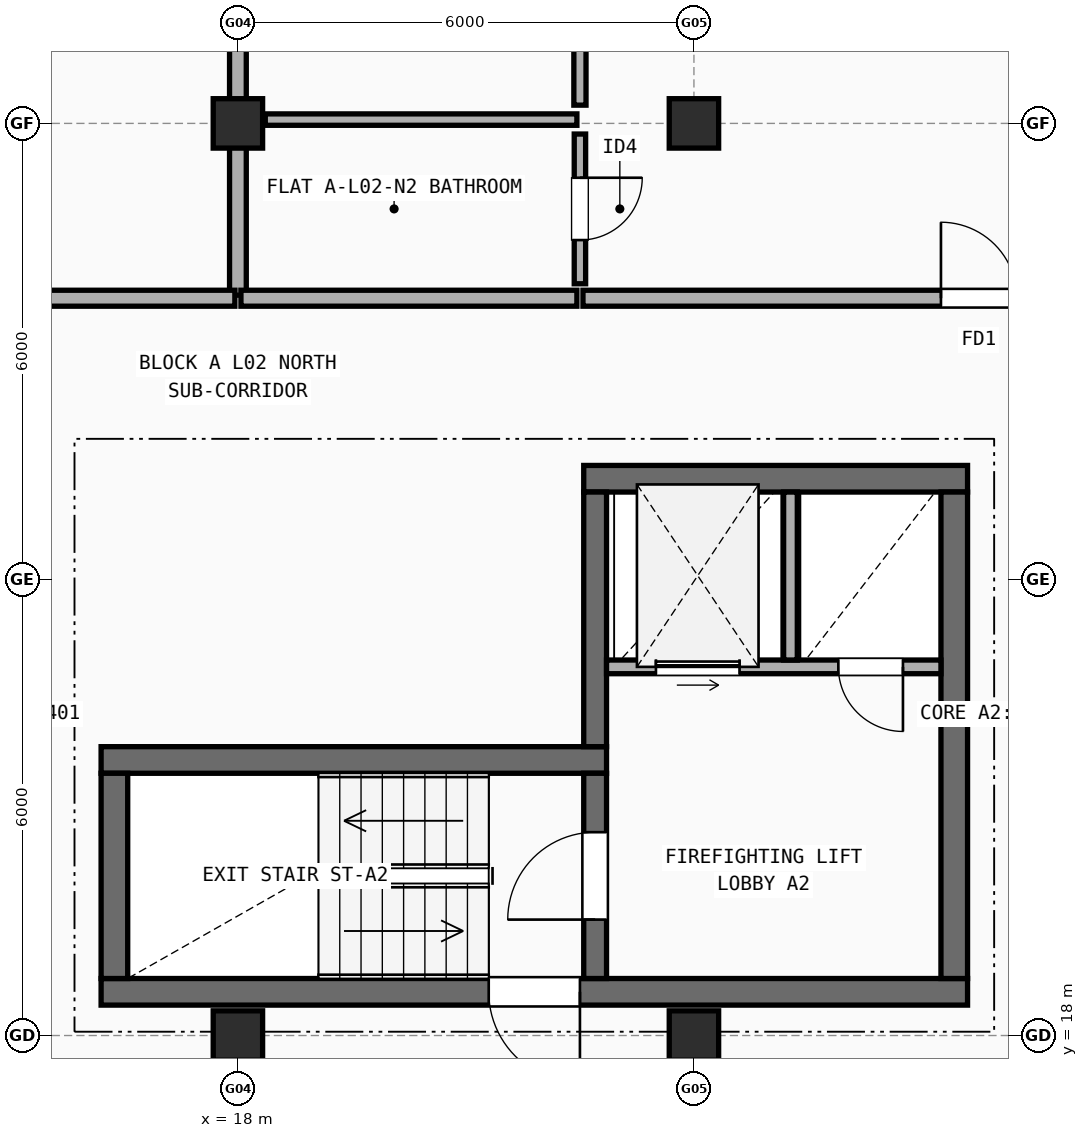
"""IFC4 building model, lengths in metres.
Left out: names, types, materials, properties, quantities, classifications, styles, units other than length and angle.
Written with IfcOpenShell. Run it as: python <this file> out.ifc"""

import sys

from ifc_helpers import new_model, si_unit, direction, frame, frame_2d, origin, origin_2d, place, context, subcontext, project, spatial, rectangle, extrude, element, fill, save


model = new_model("IFC4")
c1 = context("Model", 3, precision=1e-05, world=origin(), true_north=direction((0.0, 1.0)))
c2 = subcontext(c1, "Body", "Model", "MODEL_VIEW")
j1 = project(units=[si_unit("LENGTHUNIT", "METRE"), si_unit("PLANEANGLEUNIT", "RADIAN")], contexts=[c1])
p1 = place(None, origin())
s1 = spatial("IfcSite", under=j1, at=p1, CompositionType="ELEMENT")
p2 = place(p1, origin())
s2 = spatial("IfcBuilding", under=s1, at=p2, CompositionType="ELEMENT")
p3 = place(p2, frame((0.0, 0.0, 7.7)))
s3 = spatial("IfcBuildingStorey", under=s2, at=p3, CompositionType="ELEMENT", Elevation=7.7)
for number, where, z_axis, x_axis in (
    (1, (18.0, 18.0, 0.0), (0.0, 0.0, 1.0), (1.0, 0.0, 0.0)),
    (2, (18.0, 30.0, 0.0), (0.0, 0.0, 1.0), (1.0, 0.0, 0.0)),
    (3, (24.0, 18.0, 0.0), (0.0, 0.0, 1.0), (1.0, 0.0, 0.0)),
    (4, (24.0, 30.0, 0.0), (0.0, 0.0, 1.0), (1.0, 0.0, 0.0)),
):
    element("IfcColumn", number, at=place(p3, frame(where, z_axis=z_axis, x_axis=x_axis)), inside=s3, PredefinedType="COLUMN", context=c2, shape_type="SweptSolid", body=[
        extrude(rectangle(XDim=0.65, YDim=0.65, at=origin_2d()), origin(), (0.0, 0.0, 1.0), 2.955),
    ])
p4 = place(p3, frame((16.2, 18.575, 0.0), z_axis=(0.0, 0.0, 1.0), x_axis=(1.0, 0.0, 0.0)))
e5 = element("IfcWall", 5, at=p4, inside=s3, PredefinedType="SHEAR", context=c2, shape_type="SweptSolid", body=[
    extrude(rectangle(XDim=11.4, YDim=0.35, at=frame_2d((5.7, 0.0))), origin(), (0.0, 0.0, 1.0), 2.955),
])
p5 = place(p4, frame((5.1, 0.0, 0.0)))
e6 = element("IfcOpeningElement", 6, at=p5, cuts=e5, PredefinedType="OPENING", context=c2, shape_type="SweptSolid", body=[
    extrude(rectangle(XDim=1.2, YDim=2.15, at=frame_2d((0.6, 1.075))), frame((0.0, 0.185, 0.0), z_axis=(0.0, -1.0, 0.0), x_axis=(1.0, 0.0, 0.0)), (0.0, 0.0, 1.0), 0.37),
])
p6 = place(p3, frame((22.85, 21.625, 0.0), z_axis=(0.0, 0.0, 1.0), x_axis=(-1.0, 0.0, 0.0)))
e7 = element("IfcWall", 7, at=p6, inside=s3, PredefinedType="SHEAR", context=c2, shape_type="SweptSolid", body=[
    extrude(rectangle(XDim=6.65, YDim=0.35, at=frame_2d((3.325, 0.0))), origin(), (0.0, 0.0, 1.0), 2.955),
])
p7 = place(p3, frame((16.375, 21.45, 0.0), z_axis=(0.0, 0.0, 1.0), x_axis=(0.0, -1.0, 0.0)))
e8 = element("IfcWall", 8, at=p7, inside=s3, PredefinedType="SHEAR", context=c2, shape_type="SweptSolid", body=[
    extrude(rectangle(XDim=2.7, YDim=0.35, at=frame_2d((1.35, 0.0))), origin(), (0.0, 0.0, 1.0), 2.955),
])
p8 = place(p3, frame((22.7, 18.75, 0.0), z_axis=(0.0, 0.0, 1.0), x_axis=(0.0, 1.0, 0.0)))
e9 = element("IfcWall", 9, at=p8, inside=s3, PredefinedType="SHEAR", context=c2, shape_type="SweptSolid", body=[
    extrude(rectangle(XDim=2.7, YDim=0.3, at=frame_2d((1.35, 0.0))), origin(), (0.0, 0.0, 1.0), 2.955),
])
p9 = place(p8, frame((0.775, 0.0, 0.0)))
e10 = element("IfcOpeningElement", 10, at=p9, cuts=e9, PredefinedType="OPENING", context=c2, shape_type="SweptSolid", body=[
    extrude(rectangle(XDim=1.15, YDim=2.15, at=frame_2d((0.575, 1.075))), frame((0.0, 0.16, 0.0), z_axis=(0.0, -1.0, 0.0), x_axis=(1.0, 0.0, 0.0)), (0.0, 0.0, 1.0), 0.32),
])
p10 = place(p3, frame((27.6, 25.325, 0.0), z_axis=(0.0, 0.0, 1.0), x_axis=(-1.0, 0.0, 0.0)))
e11 = element("IfcWall", 11, at=p10, inside=s3, PredefinedType="SHEAR", context=c2, shape_type="SweptSolid", body=[
    extrude(rectangle(XDim=5.05, YDim=0.35, at=frame_2d((2.525, 0.0))), origin(), (0.0, 0.0, 1.0), 2.955),
])
p11 = place(p3, frame((27.425, 18.75, 0.0), z_axis=(0.0, 0.0, 1.0), x_axis=(0.0, 1.0, 0.0)))
e12 = element("IfcWall", 12, at=p11, inside=s3, PredefinedType="SHEAR", context=c2, shape_type="SweptSolid", body=[
    extrude(rectangle(XDim=6.4, YDim=0.35, at=frame_2d((3.2, 0.0))), origin(), (0.0, 0.0, 1.0), 2.955),
])
p12 = place(p3, frame((22.7, 21.8, 0.0), z_axis=(0.0, 0.0, 1.0), x_axis=(0.0, 1.0, 0.0)))
e13 = element("IfcWall", 13, at=p12, inside=s3, PredefinedType="SHEAR", context=c2, shape_type="SweptSolid", body=[
    extrude(rectangle(XDim=3.35, YDim=0.3, at=frame_2d((1.675, 0.0))), origin(), (0.0, 0.0, 1.0), 2.955),
])
p13 = place(p3, frame((22.85, 22.85, 0.0), z_axis=(0.0, 0.0, 1.0), x_axis=(1.0, 0.0, 0.0)))
e14 = element("IfcWall", 14, at=p13, inside=s3, PredefinedType="SOLIDWALL", context=c2, shape_type="SweptSolid", body=[
    extrude(rectangle(XDim=4.4, YDim=0.18, at=frame_2d((2.2, 0.0))), origin(), (0.0, 0.0, 1.0), 2.955),
])
p14 = place(p13, frame((0.65, 0.0, 0.0)))
e15 = element("IfcOpeningElement", 15, at=p14, cuts=e14, PredefinedType="OPENING", context=c2, shape_type="SweptSolid", body=[
    extrude(rectangle(XDim=1.1, YDim=2.15, at=frame_2d((0.55, 1.075))), frame((0.0, 0.1, 0.0), z_axis=(0.0, -1.0, 0.0), x_axis=(1.0, 0.0, 0.0)), (0.0, 0.0, 1.0), 0.2),
])
p15 = place(p13, frame((3.05, 0.0, 0.0)))
e16 = element("IfcOpeningElement", 16, at=p15, cuts=e14, PredefinedType="OPENING", context=c2, shape_type="SweptSolid", body=[
    extrude(rectangle(XDim=0.85, YDim=2.1, at=frame_2d((0.425, 1.05))), frame((0.0, 0.1, 0.0), z_axis=(0.0, -1.0, 0.0), x_axis=(1.0, 0.0, 0.0)), (0.0, 0.0, 1.0), 0.2),
])
p16 = place(p3, frame((25.27, 22.94, 0.0), z_axis=(0.0, 0.0, 1.0), x_axis=(0.0, 1.0, 0.0)))
e17 = element("IfcWall", 17, at=p16, inside=s3, PredefinedType="SOLIDWALL", context=c2, shape_type="SweptSolid", body=[
    extrude(rectangle(XDim=2.21, YDim=0.18, at=frame_2d((1.105, 0.0))), origin(), (0.0, 0.0, 1.0), 2.955),
])
p17 = place(p3, frame((18.0, 27.74, 0.0), z_axis=(0.0, 0.0, 1.0), x_axis=(0.0, 1.0, 0.0)))
e18 = element("IfcWall", 18, at=p17, inside=s3, PredefinedType="SOLIDWALL", context=c2, shape_type="SweptSolid", body=[
    extrude(rectangle(XDim=13.87, YDim=0.22, at=frame_2d((6.935, 0.0))), origin(), (0.0, 0.0, 1.0), 2.337),
])
p18 = place(p3, frame((15.04, 27.7, 0.0), z_axis=(0.0, 0.0, 1.0), x_axis=(1.0, 0.0, 0.0)))
e19 = element("IfcWall", 19, at=p18, inside=s3, PredefinedType="SOLIDWALL", context=c2, shape_type="SweptSolid", body=[
    extrude(rectangle(XDim=2.92, YDim=0.21, at=frame_2d((1.46, 0.0))), origin(), (0.0, 0.0, 1.0), 2.955),
])
p19 = place(p3, frame((18.04, 27.7, 0.0), z_axis=(0.0, 0.0, 1.0), x_axis=(1.0, 0.0, 0.0)))
e20 = element("IfcWall", 20, at=p19, inside=s3, PredefinedType="SOLIDWALL", context=c2, shape_type="SweptSolid", body=[
    extrude(rectangle(XDim=4.42, YDim=0.21, at=frame_2d((2.21, 0.0))), origin(), (0.0, 0.0, 1.0), 2.955),
])
p20 = place(p3, frame((22.54, 27.7, 0.0), z_axis=(0.0, 0.0, 1.0), x_axis=(1.0, 0.0, 0.0)))
e21 = element("IfcWall", 21, at=p20, inside=s3, PredefinedType="SOLIDWALL", context=c2, shape_type="SweptSolid", body=[
    extrude(rectangle(XDim=10.42, YDim=0.21, at=frame_2d((5.21, 0.0))), origin(), (0.0, 0.0, 1.0), 2.437),
])
p21 = place(p20, frame((4.71, 0.0, 0.0)))
e22 = element("IfcOpeningElement", 22, at=p21, cuts=e21, PredefinedType="OPENING", context=c2, shape_type="SweptSolid", body=[
    extrude(rectangle(XDim=1.0, YDim=2.15, at=frame_2d((0.5, 1.075))), frame((0.0, 0.115, 0.0), z_axis=(0.0, -1.0, 0.0), x_axis=(1.0, 0.0, 0.0)), (0.0, 0.0, 1.0), 0.23),
])
p22 = place(p3, frame((22.5, 30.24, 0.0), z_axis=(0.0, 0.0, 1.0), x_axis=(0.0, 1.0, 0.0)))
e23 = element("IfcWall", 23, at=p22, inside=s3, PredefinedType="PLUMBINGWALL", context=c2, shape_type="SweptSolid", body=[
    extrude(rectangle(XDim=7.37, YDim=0.16, at=frame_2d((3.685, 0.0))), origin(), (0.0, 0.0, 1.0), 2.437),
])
p23 = place(p22, frame((3.245, 0.0, 0.0)))
e24 = element("IfcOpeningElement", 24, at=p23, cuts=e23, PredefinedType="OPENING", context=c2, shape_type="SweptSolid", body=[
    extrude(rectangle(XDim=0.88, YDim=2.1, at=frame_2d((0.44, 1.05))), frame((0.0, 0.09, 0.0), z_axis=(0.0, -1.0, 0.0), x_axis=(1.0, 0.0, 0.0)), (0.0, 0.0, 1.0), 0.18),
])
p24 = place(p3, frame((22.5, 27.89, 0.0), z_axis=(0.0, 0.0, 1.0), x_axis=(0.0, 1.0, 0.0)))
e25 = element("IfcWall", 25, at=p24, inside=s3, PredefinedType="PARTITIONING", context=c2, shape_type="SweptSolid", body=[
    extrude(rectangle(XDim=1.97, YDim=0.15, at=frame_2d((0.985, 0.0))), origin(), (0.0, 0.0, 1.0), 2.955),
])
p25 = place(p24, frame((0.575, 0.0, 0.0)))
e26 = element("IfcOpeningElement", 26, at=p25, cuts=e25, PredefinedType="OPENING", context=c2, shape_type="SweptSolid", body=[
    extrude(rectangle(XDim=0.82, YDim=2.08, at=frame_2d((0.41, 1.04))), frame((0.0, 0.085, 0.0), z_axis=(0.0, -1.0, 0.0), x_axis=(1.0, 0.0, 0.0)), (0.0, 0.0, 1.0), 0.17),
])
p26 = place(p3, frame((18.36, 30.05, 0.0), z_axis=(0.0, 0.0, 1.0), x_axis=(1.0, 0.0, 0.0)))
e27 = element("IfcWall", 27, at=p26, inside=s3, PredefinedType="PARTITIONING", context=c2, shape_type="SweptSolid", body=[
    extrude(rectangle(XDim=4.1, YDim=0.15, at=frame_2d((2.05, 0.0))), origin(), (0.0, 0.0, 1.0), 2.437),
])
p27 = place(p5, origin())
e28 = element("IfcDoor", 28, at=p27, inside=s3, OperationType="SINGLE_SWING_RIGHT", PredefinedType="DOOR", context=c2, shape_type="SweptSolid", body=[
    extrude(rectangle(XDim=1.2, YDim=2.15, at=frame_2d((0.6, 1.075))), frame((0.0, 0.025, 0.0), z_axis=(0.0, -1.0, 0.0), x_axis=(1.0, 0.0, 0.0)), (0.0, 0.0, 1.0), 0.05),
])
fill(e6, e28)
p28 = place(p9, origin())
e29 = element("IfcDoor", 29, at=p28, inside=s3, OperationType="SINGLE_SWING_LEFT", PredefinedType="DOOR", context=c2, shape_type="SweptSolid", body=[
    extrude(rectangle(XDim=1.15, YDim=2.15, at=frame_2d((0.575, 1.075))), frame((0.0, 0.025, 0.0), z_axis=(0.0, -1.0, 0.0), x_axis=(1.0, 0.0, 0.0)), (0.0, 0.0, 1.0), 0.05),
])
fill(e10, e29)
p29 = place(p14, origin())
e30 = element("IfcDoor", 30, at=p29, inside=s3, OperationType="SLIDING_TO_LEFT", PredefinedType="DOOR", context=c2, shape_type="SweptSolid", body=[
    extrude(rectangle(XDim=1.1, YDim=2.15, at=frame_2d((0.55, 1.075))), frame((0.0, 0.025, 0.0), z_axis=(0.0, -1.0, 0.0), x_axis=(1.0, 0.0, 0.0)), (0.0, 0.0, 1.0), 0.05),
])
fill(e15, e30)
p30 = place(p15, frame((0.85, 0.0, 0.0), z_axis=(0.0, 0.0, 1.0), x_axis=(-1.0, 0.0, 0.0)))
e31 = element("IfcDoor", 31, at=p30, inside=s3, OperationType="SINGLE_SWING_RIGHT", PredefinedType="DOOR", context=c2, shape_type="SweptSolid", body=[
    extrude(rectangle(XDim=0.85, YDim=2.1, at=frame_2d((0.425, 1.05))), frame((0.0, 0.025, 0.0), z_axis=(0.0, -1.0, 0.0), x_axis=(1.0, 0.0, 0.0)), (0.0, 0.0, 1.0), 0.05),
])
fill(e16, e31)
p31 = place(p21, origin())
e32 = element("IfcDoor", 32, at=p31, inside=s3, OperationType="SINGLE_SWING_LEFT", PredefinedType="DOOR", context=c2, shape_type="SweptSolid", body=[
    extrude(rectangle(XDim=1.0, YDim=2.15, at=frame_2d((0.5, 1.075))), frame((0.0, 0.025, 0.0), z_axis=(0.0, -1.0, 0.0), x_axis=(1.0, 0.0, 0.0)), (0.0, 0.0, 1.0), 0.05),
])
fill(e22, e32)
p32 = place(p25, origin())
e33 = element("IfcDoor", 33, at=p32, inside=s3, OperationType="SINGLE_SWING_RIGHT", PredefinedType="DOOR", context=c2, shape_type="SweptSolid", body=[
    extrude(rectangle(XDim=0.82, YDim=2.08, at=frame_2d((0.41, 1.04))), frame((0.0, 0.025, 0.0), z_axis=(0.0, -1.0, 0.0), x_axis=(1.0, 0.0, 0.0)), (0.0, 0.0, 1.0), 0.05),
])
fill(e26, e33)
save(model, sys.argv[1])
